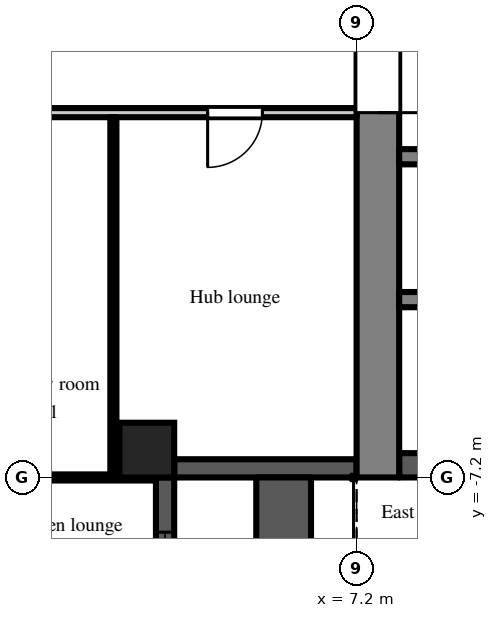
"""IFC4 building model, lengths in metres.
Left out: names, types, materials, properties, quantities, classifications, styles, units other than length and angle.
Written with IfcOpenShell. Run it as: python <this file> out.ifc"""

import sys

from ifc_helpers import new_model, si_unit, direction, frame, frame_2d, origin, origin_2d, place, context, subcontext, project, spatial, rectangle, extrude, element, fill, save


model = new_model("IFC4")
c1 = context("Model", 3, precision=1e-05, world=origin(), true_north=direction((0.0, 1.0)))
c2 = subcontext(c1, "Body", "Model", "MODEL_VIEW")
j1 = project(units=[si_unit("LENGTHUNIT", "METRE"), si_unit("PLANEANGLEUNIT", "RADIAN")], contexts=[c1])
p1 = place(None, origin())
s1 = spatial("IfcSite", under=j1, at=p1, CompositionType="ELEMENT")
p2 = place(p1, origin())
s2 = spatial("IfcBuilding", under=s1, at=p2, CompositionType="ELEMENT")
p3 = place(p2, frame((0.0, 0.0, 179.7)))
s3 = spatial("IfcBuildingStorey", under=s2, at=p3, CompositionType="ELEMENT", Elevation=179.7)
p4 = place(p3, frame((3.75, -6.75, 0.0), z_axis=(0.0, 0.0, 1.0), x_axis=(1.0, 0.0, 0.0)))
e1 = element("IfcColumn", 1, at=p4, inside=s3, PredefinedType="COLUMN", context=c2, shape_type="SweptSolid", body=[
    extrude(rectangle(XDim=0.9, YDim=0.9, at=origin_2d()), origin(), (0.0, 0.0, 1.0), 3.0),
])
p5 = place(p3, frame((4.05, -14.4, 0.0), z_axis=(0.0, 0.0, 1.0), x_axis=(0.0, 1.0, 0.0)))
e2 = element("IfcWall", 2, at=p5, inside=s3, PredefinedType="SOLIDWALL", context=c2, shape_type="SweptSolid", body=[
    extrude(rectangle(XDim=7.2, YDim=0.3, at=frame_2d((3.6, 0.0))), origin(), (0.0, 0.0, 1.0), 2.2),
])
p6 = place(p5, frame((3.0, 0.0, 0.0)))
e3 = element("IfcOpeningElement", 3, at=p6, cuts=e2, PredefinedType="OPENING", context=c2, shape_type="SweptSolid", body=[
    extrude(rectangle(XDim=1.2, YDim=2.05, at=frame_2d((0.6, 1.025))), frame((0.0, 0.16, 0.0), z_axis=(0.0, -1.0, 0.0), x_axis=(1.0, 0.0, 0.0)), (0.0, 0.0, 1.0), 0.32),
])
p7 = place(p5, frame((0.9, 0.0, 0.2)))
e4 = element("IfcOpeningElement", 4, at=p7, cuts=e2, PredefinedType="OPENING", context=c2, shape_type="SweptSolid", body=[
    extrude(rectangle(XDim=1.8, YDim=1.85, at=frame_2d((0.9, 0.925))), frame((0.0, 0.16, 0.0), z_axis=(0.0, -1.0, 0.0), x_axis=(1.0, 0.0, 0.0)), (0.0, 0.0, 1.0), 0.32),
])
p8 = place(p5, frame((4.5, 0.0, 0.2)))
e5 = element("IfcOpeningElement", 5, at=p8, cuts=e2, PredefinedType="OPENING", context=c2, shape_type="SweptSolid", body=[
    extrude(rectangle(XDim=1.8, YDim=1.85, at=frame_2d((0.9, 0.925))), frame((0.0, 0.16, 0.0), z_axis=(0.0, -1.0, 0.0), x_axis=(1.0, 0.0, 0.0)), (0.0, 0.0, 1.0), 0.32),
])
p9 = place(p3, frame((4.2, -7.05, 0.0), z_axis=(0.0, 0.0, 1.0), x_axis=(1.0, 0.0, 0.0)))
e6 = element("IfcWall", 6, at=p9, inside=s3, PredefinedType="SOLIDWALL", context=c2, shape_type="SweptSolid", body=[
    extrude(rectangle(XDim=3.0, YDim=0.3, at=frame_2d((1.5, 0.0))), origin(), (0.0, 0.0, 1.0), 2.2),
])
p10 = place(p3, frame((6.0, -14.4, 0.0), z_axis=(0.0, 0.0, 1.0), x_axis=(0.0, 1.0, 0.0)))
e7 = element("IfcWall", 7, at=p10, inside=s3, PredefinedType="PARAPET", context=c2, shape_type="SweptSolid", body=[
    extrude(rectangle(XDim=7.2, YDim=0.9, at=frame_2d((3.6, 0.0))), origin(), (0.0, 0.0, 1.0), 0.8),
])
p11 = place(p3, frame((7.55, -7.2, 0.0), z_axis=(0.0, 0.0, 1.0), x_axis=(0.0, 1.0, 0.0)))
e8 = element("IfcWall", 8, at=p11, inside=s3, PredefinedType="SHEAR", context=c2, shape_type="SweptSolid", body=[
    extrude(rectangle(XDim=14.4, YDim=0.7, at=frame_2d((7.2, 0.0))), origin(), (0.0, 0.0, 1.0), 2.6),
])
p12 = place(p11, frame((6.0, 0.0, 0.0)))
e9 = element("IfcOpeningElement", 9, at=p12, cuts=e8, PredefinedType="OPENING", context=c2, shape_type="SweptSolid", body=[
    extrude(rectangle(XDim=2.4, YDim=2.2, at=frame_2d((1.2, 1.1))), frame((0.0, 0.36, 0.0), z_axis=(0.0, -1.0, 0.0), x_axis=(1.0, 0.0, 0.0)), (0.0, 0.0, 1.0), 0.72),
])
p13 = place(p3, frame((7.9, -7.0, 0.0), z_axis=(0.0, 0.0, 1.0), x_axis=(1.0, 0.0, 0.0)))
e10 = element("IfcWall", 10, at=p13, inside=s3, PredefinedType="SHEAR", context=c2, shape_type="SweptSolid", body=[
    extrude(rectangle(XDim=12.95, YDim=0.4, at=frame_2d((6.475, 0.0))), origin(), (0.0, 0.0, 1.0), 2.6),
])
p14 = place(p3, frame((7.9, -1.925, 0.0), z_axis=(0.0, 0.0, 1.0), x_axis=(1.0, 0.0, 0.0)))
e11 = element("IfcWall", 11, at=p14, inside=s3, PredefinedType="SHEAR", context=c2, shape_type="SweptSolid", body=[
    extrude(rectangle(XDim=12.95, YDim=0.25, at=frame_2d((6.475, 0.0))), origin(), (0.0, 0.0, 1.0), 2.6),
])
p15 = place(p14, frame((0.525, 0.0, 0.0)))
e12 = element("IfcOpeningElement", 12, at=p15, cuts=e11, PredefinedType="OPENING", context=c2, shape_type="SweptSolid", body=[
    extrude(rectangle(XDim=0.9, YDim=2.1, at=frame_2d((0.45, 1.05))), frame((0.0, 0.135, 0.0), z_axis=(0.0, -1.0, 0.0), x_axis=(1.0, 0.0, 0.0)), (0.0, 0.0, 1.0), 0.27),
])
p16 = place(p14, frame((2.625, 0.0, 0.0)))
e13 = element("IfcOpeningElement", 13, at=p16, cuts=e11, PredefinedType="OPENING", context=c2, shape_type="SweptSolid", body=[
    extrude(rectangle(XDim=1.1, YDim=2.1, at=frame_2d((0.55, 1.05))), frame((0.0, 0.135, 0.0), z_axis=(0.0, -1.0, 0.0), x_axis=(1.0, 0.0, 0.0)), (0.0, 0.0, 1.0), 0.27),
])
p17 = place(p14, frame((4.925, 0.0, 0.0)))
e14 = element("IfcOpeningElement", 14, at=p17, cuts=e11, PredefinedType="OPENING", context=c2, shape_type="SweptSolid", body=[
    extrude(rectangle(XDim=0.9, YDim=2.1, at=frame_2d((0.45, 1.05))), frame((0.0, 0.135, 0.0), z_axis=(0.0, -1.0, 0.0), x_axis=(1.0, 0.0, 0.0)), (0.0, 0.0, 1.0), 0.27),
])
p18 = place(p14, frame((8.225, 0.0, 0.0)))
e15 = element("IfcOpeningElement", 15, at=p18, cuts=e11, PredefinedType="OPENING", context=c2, shape_type="SweptSolid", body=[
    extrude(rectangle(XDim=0.9, YDim=2.1, at=frame_2d((0.45, 1.05))), frame((0.0, 0.135, 0.0), z_axis=(0.0, -1.0, 0.0), x_axis=(1.0, 0.0, 0.0)), (0.0, 0.0, 1.0), 0.27),
])
p19 = place(p14, frame((11.525, 0.0, 0.0)))
e16 = element("IfcOpeningElement", 16, at=p19, cuts=e11, PredefinedType="OPENING", context=c2, shape_type="SweptSolid", body=[
    extrude(rectangle(XDim=0.9, YDim=2.1, at=frame_2d((0.45, 1.05))), frame((0.0, 0.135, 0.0), z_axis=(0.0, -1.0, 0.0), x_axis=(1.0, 0.0, 0.0)), (0.0, 0.0, 1.0), 0.27),
])
p20 = place(p3, frame((7.9, -4.275, 0.0), z_axis=(0.0, 0.0, 1.0), x_axis=(1.0, 0.0, 0.0)))
e17 = element("IfcWall", 17, at=p20, inside=s3, PredefinedType="SHEAR", context=c2, shape_type="SweptSolid", body=[
    extrude(rectangle(XDim=1.95, YDim=0.25, at=frame_2d((0.975, 0.0))), origin(), (0.0, 0.0, 1.0), 2.6),
])
p21 = place(p3, frame((1.275, -7.2, 0.0), z_axis=(0.0, 0.0, 1.0), x_axis=(1.0, 0.0, 0.0)))
e18 = element("IfcWall", 18, at=p21, inside=s3, PredefinedType="PARTITIONING", context=c2, shape_type="SweptSolid", body=[
    extrude(rectangle(XDim=2.625, YDim=0.1, at=frame_2d((1.312, 0.0))), origin(), (0.0, 0.0, 1.0), 2.6),
])
p22 = place(p3, frame((1.275, -1.2, 0.0), z_axis=(0.0, 0.0, 1.0), x_axis=(1.0, 0.0, 0.0)))
e19 = element("IfcWall", 19, at=p22, inside=s3, PredefinedType="PARTITIONING", context=c2, shape_type="SweptSolid", body=[
    extrude(rectangle(XDim=5.925, YDim=0.15, at=frame_2d((2.962, 0.0))), origin(), (0.0, 0.0, 1.0), 2.6),
])
p23 = place(p22, frame((3.475, 0.0, 0.0)))
e20 = element("IfcOpeningElement", 20, at=p23, cuts=e19, PredefinedType="OPENING", context=c2, shape_type="SweptSolid", body=[
    extrude(rectangle(XDim=0.9, YDim=2.1, at=frame_2d((0.45, 1.05))), frame((0.0, 0.085, 0.0), z_axis=(0.0, -1.0, 0.0), x_axis=(1.0, 0.0, 0.0)), (0.0, 0.0, 1.0), 0.17),
])
p24 = place(p3, frame((3.2, -7.15, 0.0), z_axis=(0.0, 0.0, 1.0), x_axis=(0.0, 1.0, 0.0)))
e21 = element("IfcWall", 21, at=p24, inside=s3, PredefinedType="PARTITIONING", context=c2, shape_type="SweptSolid", body=[
    extrude(rectangle(XDim=5.875, YDim=0.1, at=frame_2d((2.938, 0.0))), origin(), (0.0, 0.0, 1.0), 2.6),
])
p25 = place(p8, origin())
e22 = element("IfcWindow", 22, at=p25, inside=s3, PartitioningType="SINGLE_PANEL", PredefinedType="WINDOW", context=c2, shape_type="SweptSolid", body=[
    extrude(rectangle(XDim=1.8, YDim=1.85, at=frame_2d((0.9, 0.925))), frame((0.0, 0.03, 0.0), z_axis=(0.0, -1.0, 0.0), x_axis=(1.0, 0.0, 0.0)), (0.0, 0.0, 1.0), 0.06),
])
fill(e5, e22)
p26 = place(p12, frame((2.4, 0.0, 0.0), z_axis=(0.0, 0.0, 1.0), x_axis=(-1.0, 0.0, 0.0)))
e23 = element("IfcDoor", 23, at=p26, inside=s3, OperationType="DOUBLE_DOOR_DOUBLE_SWING", PredefinedType="DOOR", context=c2, shape_type="SweptSolid", body=[
    extrude(rectangle(XDim=2.4, YDim=2.2, at=frame_2d((1.2, 1.1))), frame((0.0, 0.025, 0.0), z_axis=(0.0, -1.0, 0.0), x_axis=(1.0, 0.0, 0.0)), (0.0, 0.0, 1.0), 0.05),
])
fill(e9, e23)
p27 = place(p23, frame((0.9, 0.0, 0.0), z_axis=(0.0, 0.0, 1.0), x_axis=(-1.0, 0.0, 0.0)))
e24 = element("IfcDoor", 24, at=p27, inside=s3, OperationType="SINGLE_SWING_RIGHT", PredefinedType="DOOR", context=c2, shape_type="SweptSolid", body=[
    extrude(rectangle(XDim=0.9, YDim=2.1, at=frame_2d((0.45, 1.05))), frame((0.0, 0.025, 0.0), z_axis=(0.0, -1.0, 0.0), x_axis=(1.0, 0.0, 0.0)), (0.0, 0.0, 1.0), 0.05),
])
fill(e20, e24)
save(model, sys.argv[1])
